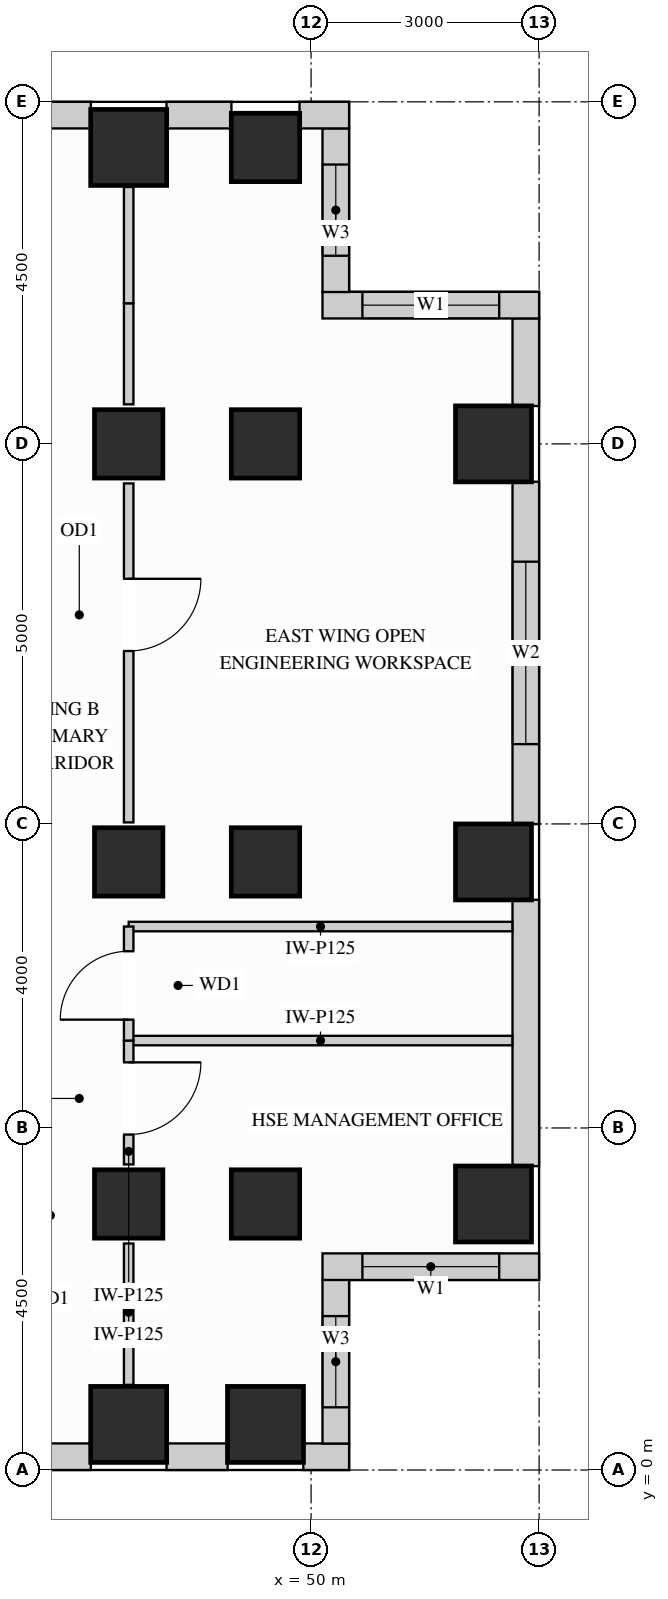
"""IFC4 building model, lengths in metres.
Left out: names, types, materials, properties, quantities, classifications, styles, units other than length and angle.
Written with IfcOpenShell. Run it as: python <this file> out.ifc"""

import sys

from ifc_helpers import new_model, si_unit, direction, frame, frame_2d, origin, origin_2d, place, context, subcontext, project, spatial, rectangle, extrude, source, transform, mapped, element, fill, save


model = new_model("IFC4")
c1 = context("Model", 3, precision=1e-05, world=origin(), true_north=direction((0.0, 1.0)))
c2 = subcontext(c1, "Body", "Model", "MODEL_VIEW")
j1 = project(units=[si_unit("LENGTHUNIT", "METRE"), si_unit("PLANEANGLEUNIT", "RADIAN")], contexts=[c1])
p1 = place(None, origin())
s1 = spatial("IfcSite", under=j1, at=p1, CompositionType="ELEMENT")
p2 = place(p1, origin())
s2 = spatial("IfcBuilding", under=s1, at=p2, CompositionType="ELEMENT")
p3 = place(p2, frame((0.0, 0.0, 157.5)))
s3 = spatial("IfcBuildingStorey", under=s2, at=p3, CompositionType="ELEMENT", Elevation=157.5)
m1 = source(origin(), c2, "Body", "SweptSolid", [
    extrude(rectangle(XDim=0.9, YDim=0.9, at=origin_2d()), origin(), (0.0, 0.0, 1.0), 3.4),
])
for number, where, z_axis, x_axis in (
    (1, (47.6, 13.5, 0.0), (0.0, 0.0, 1.0), (1.0, 0.0, 0.0)),
    (2, (47.6, 3.5, 0.0), (0.0, 0.0, 1.0), (1.0, 0.0, 0.0)),
    (3, (47.6, 8.0, 0.0), (0.0, 0.0, 1.0), (1.0, 0.0, 0.0)),
    (4, (49.4, 13.5, 0.0), (0.0, 0.0, 1.0), (1.0, 0.0, 0.0)),
    (5, (49.4, 17.4, 0.0), (0.0, 0.0, 1.0), (1.0, 0.0, 0.0)),
    (6, (49.4, 3.5, 0.0), (0.0, 0.0, 1.0), (1.0, 0.0, 0.0)),
    (7, (49.4, 8.0, 0.0), (0.0, 0.0, 1.0), (1.0, 0.0, 0.0)),
):
    element("IfcColumn", number, at=place(p3, frame(where, z_axis=z_axis, x_axis=x_axis)), inside=s3, PredefinedType="COLUMN", context=c2, shape_type="MappedRepresentation", body=[
        mapped(m1, transform((0.0, 0.0, 0.0), x_axis=(1.0, 0.0, 0.0), y_axis=(0.0, 1.0, 0.0), z_axis=(0.0, 0.0, 1.0))),
    ])
m2 = source(origin(), c2, "Body", "SweptSolid", [
    extrude(rectangle(XDim=1.0, YDim=1.0, at=origin_2d()), origin(), (0.0, 0.0, 1.0), 3.4),
])
for number, where, z_axis, x_axis in (
    (8, (47.6, 17.4, 0.0), (0.0, 0.0, 1.0), (1.0, 0.0, 0.0)),
    (9, (52.4, 13.5, 0.0), (0.0, 0.0, 1.0), (1.0, 0.0, 0.0)),
    (10, (52.4, 3.5, 0.0), (0.0, 0.0, 1.0), (1.0, 0.0, 0.0)),
    (11, (52.4, 8.0, 0.0), (0.0, 0.0, 1.0), (1.0, 0.0, 0.0)),
    (12, (47.6, 0.6, 0.0), (0.0, 0.0, 1.0), (1.0, 0.0, 0.0)),
    (13, (49.4, 0.6, 0.0), (0.0, 0.0, 1.0), (1.0, 0.0, 0.0)),
):
    element("IfcColumn", number, at=place(p3, frame(where, z_axis=z_axis, x_axis=x_axis)), inside=s3, PredefinedType="COLUMN", context=c2, shape_type="MappedRepresentation", body=[
        mapped(m2, transform((0.0, 0.0, 0.0), x_axis=(1.0, 0.0, 0.0), y_axis=(0.0, 1.0, 0.0), z_axis=(0.0, 0.0, 1.0))),
    ])
p4 = place(p3, frame((40.498, 0.175, 0.0), z_axis=(0.0, 0.0, 1.0), x_axis=(1.0, 0.0, 0.0)))
e14 = element("IfcWall", 14, at=p4, inside=s3, PredefinedType="SOLIDWALL", context=c2, shape_type="SweptSolid", body=[
    extrude(rectangle(XDim=6.604, YDim=0.35, at=frame_2d((3.302, 0.0))), origin(), (0.0, 0.0, 1.0), 2.612),
])
p5 = place(p4, frame((0.737, 0.0, 0.78)))
e15 = element("IfcOpeningElement", 15, at=p5, cuts=e14, PredefinedType="OPENING", context=c2, shape_type="SweptSolid", body=[
    extrude(rectangle(XDim=1.8, YDim=1.652, at=frame_2d((0.9, 0.826))), frame((0.0, 0.185, 0.0), z_axis=(0.0, -1.0, 0.0), x_axis=(1.0, 0.0, 0.0)), (0.0, 0.0, 1.0), 0.37),
])
p6 = place(p4, frame((2.955, 0.0, 0.78)))
e16 = element("IfcOpeningElement", 16, at=p6, cuts=e14, PredefinedType="OPENING", context=c2, shape_type="SweptSolid", body=[
    extrude(rectangle(XDim=1.8, YDim=1.652, at=frame_2d((0.9, 0.826))), frame((0.0, 0.185, 0.0), z_axis=(0.0, -1.0, 0.0), x_axis=(1.0, 0.0, 0.0)), (0.0, 0.0, 1.0), 0.37),
])
m3 = source(origin(), c2, "Body", "SweptSolid", [
    extrude(rectangle(XDim=0.804, YDim=0.35, at=frame_2d((0.402, 0.0))), origin(), (0.0, 0.0, 1.0), 3.385),
])
p7 = place(p3, frame((48.098, 0.175, 0.0), z_axis=(0.0, 0.0, 1.0), x_axis=(1.0, 0.0, 0.0)))
e17 = element("IfcWall", 17, at=p7, inside=s3, PredefinedType="SOLIDWALL", context=c2, shape_type="MappedRepresentation", body=[
    mapped(m3, transform((0.0, 0.0, 0.0), x_axis=(1.0, 0.0, 0.0), y_axis=(0.0, 1.0, 0.0), z_axis=(0.0, 0.0, 1.0))),
])
m4 = source(origin(), c2, "Body", "SweptSolid", [
    extrude(rectangle(XDim=0.602, YDim=0.35, at=frame_2d((0.301, 0.0))), origin(), (0.0, 0.0, 1.0), 3.385),
])
p8 = place(p3, frame((49.898, 0.175, 0.0), z_axis=(0.0, 0.0, 1.0), x_axis=(1.0, 0.0, 0.0)))
e18 = element("IfcWall", 18, at=p8, inside=s3, PredefinedType="SOLIDWALL", context=c2, shape_type="MappedRepresentation", body=[
    mapped(m4, transform((0.0, 0.0, 0.0), x_axis=(1.0, 0.0, 0.0), y_axis=(0.0, 1.0, 0.0), z_axis=(0.0, 0.0, 1.0))),
])
p9 = place(p3, frame((50.325, 0.348, 0.0), z_axis=(0.0, 0.0, 1.0), x_axis=(0.0, 1.0, 0.0)))
e19 = element("IfcWall", 19, at=p9, inside=s3, PredefinedType="SOLIDWALL", context=c2, shape_type="SweptSolid", body=[
    extrude(rectangle(XDim=2.154, YDim=0.35, at=frame_2d((1.077, 0.0))), origin(), (0.0, 0.0, 1.0), 3.385),
])
p10 = place(p9, frame((0.477, 0.0, 0.78)))
e20 = element("IfcOpeningElement", 20, at=p10, cuts=e19, PredefinedType="OPENING", context=c2, shape_type="SweptSolid", body=[
    extrude(rectangle(XDim=1.2, YDim=2.1, at=frame_2d((0.6, 1.05))), frame((0.0, 0.185, 0.0), z_axis=(0.0, -1.0, 0.0), x_axis=(1.0, 0.0, 0.0)), (0.0, 0.0, 1.0), 0.37),
])
p11 = place(p3, frame((50.15, 2.675, 0.0), z_axis=(0.0, 0.0, 1.0), x_axis=(1.0, 0.0, 0.0)))
e21 = element("IfcWall", 21, at=p11, inside=s3, PredefinedType="SOLIDWALL", context=c2, shape_type="SweptSolid", body=[
    extrude(rectangle(XDim=2.85, YDim=0.35, at=frame_2d((1.425, 0.0))), origin(), (0.0, 0.0, 1.0), 3.385),
])
p12 = place(p11, frame((0.525, 0.0, 0.78)))
e22 = element("IfcOpeningElement", 22, at=p12, cuts=e21, PredefinedType="OPENING", context=c2, shape_type="SweptSolid", body=[
    extrude(rectangle(XDim=1.8, YDim=2.1, at=frame_2d((0.9, 1.05))), frame((0.0, 0.185, 0.0), z_axis=(0.0, -1.0, 0.0), x_axis=(1.0, 0.0, 0.0)), (0.0, 0.0, 1.0), 0.37),
])
m5 = source(origin(), c2, "Body", "SweptSolid", [
    extrude(rectangle(XDim=3.504, YDim=0.35, at=frame_2d((1.752, 0.0))), origin(), (0.0, 0.0, 1.0), 2.612),
])
p13 = place(p3, frame((52.825, 3.998, 0.0), z_axis=(0.0, 0.0, 1.0), x_axis=(0.0, 1.0, 0.0)))
e23 = element("IfcWall", 23, at=p13, inside=s3, PredefinedType="SOLIDWALL", context=c2, shape_type="MappedRepresentation", body=[
    mapped(m5, transform((0.0, 0.0, 0.0), x_axis=(1.0, 0.0, 0.0), y_axis=(0.0, 1.0, 0.0), z_axis=(0.0, 0.0, 1.0))),
])
p14 = place(p3, frame((52.825, 8.498, 0.0), z_axis=(0.0, 0.0, 1.0), x_axis=(0.0, 1.0, 0.0)))
e24 = element("IfcWall", 24, at=p14, inside=s3, PredefinedType="SOLIDWALL", context=c2, shape_type="SweptSolid", body=[
    extrude(rectangle(XDim=4.504, YDim=0.35, at=frame_2d((2.252, 0.0))), origin(), (0.0, 0.0, 1.0), 2.612),
])
p15 = place(p14, frame((1.052, 0.0, 0.78)))
e25 = element("IfcOpeningElement", 25, at=p15, cuts=e24, PredefinedType="OPENING", context=c2, shape_type="SweptSolid", body=[
    extrude(rectangle(XDim=2.4, YDim=1.652, at=frame_2d((1.2, 0.826))), frame((0.0, 0.185, 0.0), z_axis=(0.0, -1.0, 0.0), x_axis=(1.0, 0.0, 0.0)), (0.0, 0.0, 1.0), 0.37),
])
m6 = source(origin(), c2, "Body", "SweptSolid", [
    extrude(rectangle(XDim=1.154, YDim=0.35, at=frame_2d((0.577, 0.0))), origin(), (0.0, 0.0, 1.0), 3.385),
])
p16 = place(p3, frame((52.825, 13.998, 0.0), z_axis=(0.0, 0.0, 1.0), x_axis=(0.0, 1.0, 0.0)))
e26 = element("IfcWall", 26, at=p16, inside=s3, PredefinedType="SOLIDWALL", context=c2, shape_type="MappedRepresentation", body=[
    mapped(m6, transform((0.0, 0.0, 0.0), x_axis=(1.0, 0.0, 0.0), y_axis=(0.0, 1.0, 0.0), z_axis=(0.0, 0.0, 1.0))),
])
p17 = place(p3, frame((53.0, 15.325, 0.0), z_axis=(0.0, 0.0, 1.0), x_axis=(-1.0, 0.0, 0.0)))
e27 = element("IfcWall", 27, at=p17, inside=s3, PredefinedType="SOLIDWALL", context=c2, shape_type="SweptSolid", body=[
    extrude(rectangle(XDim=2.85, YDim=0.35, at=frame_2d((1.425, 0.0))), origin(), (0.0, 0.0, 1.0), 3.385),
])
p18 = place(p17, frame((0.525, 0.0, 0.78)))
e28 = element("IfcOpeningElement", 28, at=p18, cuts=e27, PredefinedType="OPENING", context=c2, shape_type="SweptSolid", body=[
    extrude(rectangle(XDim=1.8, YDim=2.1, at=frame_2d((0.9, 1.05))), frame((0.0, 0.185, 0.0), z_axis=(0.0, -1.0, 0.0), x_axis=(1.0, 0.0, 0.0)), (0.0, 0.0, 1.0), 0.37),
])
p19 = place(p3, frame((50.325, 15.498, 0.0), z_axis=(0.0, 0.0, 1.0), x_axis=(0.0, 1.0, 0.0)))
e29 = element("IfcWall", 29, at=p19, inside=s3, PredefinedType="SOLIDWALL", context=c2, shape_type="SweptSolid", body=[
    extrude(rectangle(XDim=2.154, YDim=0.35, at=frame_2d((1.077, 0.0))), origin(), (0.0, 0.0, 1.0), 3.385),
])
p20 = place(p19, frame((0.477, 0.0, 0.78)))
e30 = element("IfcOpeningElement", 30, at=p20, cuts=e29, PredefinedType="OPENING", context=c2, shape_type="SweptSolid", body=[
    extrude(rectangle(XDim=1.2, YDim=2.1, at=frame_2d((0.6, 1.05))), frame((0.0, 0.185, 0.0), z_axis=(0.0, -1.0, 0.0), x_axis=(1.0, 0.0, 0.0)), (0.0, 0.0, 1.0), 0.37),
])
m7 = source(origin(), c2, "Body", "SweptSolid", [
    extrude(rectangle(XDim=0.652, YDim=0.35, at=frame_2d((0.326, 0.0))), origin(), (0.0, 0.0, 1.0), 3.385),
])
p21 = place(p3, frame((50.5, 17.825, 0.0), z_axis=(0.0, 0.0, 1.0), x_axis=(-1.0, 0.0, 0.0)))
e31 = element("IfcWall", 31, at=p21, inside=s3, PredefinedType="SOLIDWALL", context=c2, shape_type="MappedRepresentation", body=[
    mapped(m7, transform((0.0, 0.0, 0.0), x_axis=(1.0, 0.0, 0.0), y_axis=(0.0, 1.0, 0.0), z_axis=(0.0, 0.0, 1.0))),
])
m8 = source(origin(), c2, "Body", "SweptSolid", [
    extrude(rectangle(XDim=0.854, YDim=0.35, at=frame_2d((0.427, 0.0))), origin(), (0.0, 0.0, 1.0), 3.385),
])
p22 = place(p3, frame((48.952, 17.825, 0.0), z_axis=(0.0, 0.0, 1.0), x_axis=(-1.0, 0.0, 0.0)))
e32 = element("IfcWall", 32, at=p22, inside=s3, PredefinedType="SOLIDWALL", context=c2, shape_type="MappedRepresentation", body=[
    mapped(m8, transform((0.0, 0.0, 0.0), x_axis=(1.0, 0.0, 0.0), y_axis=(0.0, 1.0, 0.0), z_axis=(0.0, 0.0, 1.0))),
])
p23 = place(p3, frame((47.102, 17.825, 0.0), z_axis=(0.0, 0.0, 1.0), x_axis=(-1.0, 0.0, 0.0)))
e33 = element("IfcWall", 33, at=p23, inside=s3, PredefinedType="SOLIDWALL", context=c2, shape_type="SweptSolid", body=[
    extrude(rectangle(XDim=6.604, YDim=0.35, at=frame_2d((3.302, 0.0))), origin(), (0.0, 0.0, 1.0), 2.612),
])
p24 = place(p23, frame((1.849, 0.0, 0.78)))
e34 = element("IfcOpeningElement", 34, at=p24, cuts=e33, PredefinedType="OPENING", context=c2, shape_type="SweptSolid", body=[
    extrude(rectangle(XDim=1.8, YDim=1.652, at=frame_2d((0.9, 0.826))), frame((0.0, 0.185, 0.0), z_axis=(0.0, -1.0, 0.0), x_axis=(1.0, 0.0, 0.0)), (0.0, 0.0, 1.0), 0.37),
])
p25 = place(p23, frame((4.067, 0.0, 0.78)))
e35 = element("IfcOpeningElement", 35, at=p25, cuts=e33, PredefinedType="OPENING", context=c2, shape_type="SweptSolid", body=[
    extrude(rectangle(XDim=1.8, YDim=1.652, at=frame_2d((0.9, 0.826))), frame((0.0, 0.185, 0.0), z_axis=(0.0, -1.0, 0.0), x_axis=(1.0, 0.0, 0.0)), (0.0, 0.0, 1.0), 0.37),
])
m9 = source(origin(), c2, "Body", "SweptSolid", [
    extrude(rectangle(XDim=5.048, YDim=0.125, at=frame_2d((2.524, 0.0))), origin(), (0.0, 0.0, 1.0), 3.385),
])
for number, where, z_axis, x_axis in (
    (36, (47.6, 5.65, 0.0), (0.0, 0.0, 1.0), (1.0, 0.0, 0.0)),
    (37, (47.6, 7.15, 0.0), (0.0, 0.0, 1.0), (1.0, 0.0, 0.0)),
):
    element("IfcWall", number, at=place(p3, frame(where, z_axis=z_axis, x_axis=x_axis)), inside=s3, PredefinedType="PARTITIONING", context=c2, shape_type="MappedRepresentation", body=[
        mapped(m9, transform((0.0, 0.0, 0.0), x_axis=(1.0, 0.0, 0.0), y_axis=(0.0, 1.0, 0.0), z_axis=(0.0, 0.0, 1.0))),
    ])
p26 = place(p3, frame((47.6, 4.02, 0.0), z_axis=(0.0, 0.0, 1.0), x_axis=(0.0, 1.0, 0.0)))
e38 = element("IfcWall", 38, at=p26, inside=s3, PredefinedType="PARTITIONING", context=c2, shape_type="SweptSolid", body=[
    extrude(rectangle(XDim=1.63, YDim=0.125, at=frame_2d((0.815, 0.0))), origin(), (0.0, 0.0, 1.0), 2.773),
])
p27 = place(p26, frame((0.393, 0.0, 0.0)))
e39 = element("IfcOpeningElement", 39, at=p27, cuts=e38, PredefinedType="OPENING", context=c2, shape_type="SweptSolid", body=[
    extrude(rectangle(XDim=0.95, YDim=2.15, at=frame_2d((0.475, 1.075))), frame((0.0, 0.073, 0.0), z_axis=(0.0, -1.0, 0.0), x_axis=(1.0, 0.0, 0.0)), (0.0, 0.0, 1.0), 0.145),
])
m10 = source(origin(), c2, "Body", "SweptSolid", [
    extrude(rectangle(XDim=1.86, YDim=0.125, at=frame_2d((0.93, 0.0))), origin(), (0.0, 0.0, 1.0), 2.773),
])
p28 = place(p3, frame((47.6, 1.12, 0.0), z_axis=(0.0, 0.0, 1.0), x_axis=(0.0, 1.0, 0.0)))
e40 = element("IfcWall", 40, at=p28, inside=s3, PredefinedType="PARTITIONING", context=c2, shape_type="MappedRepresentation", body=[
    mapped(m10, transform((0.0, 0.0, 0.0), x_axis=(1.0, 0.0, 0.0), y_axis=(0.0, 1.0, 0.0), z_axis=(0.0, 0.0, 1.0))),
])
p29 = place(p3, frame((47.6, 8.52, 0.0), z_axis=(0.0, 0.0, 1.0), x_axis=(0.0, 1.0, 0.0)))
e41 = element("IfcWall", 41, at=p29, inside=s3, PredefinedType="PARTITIONING", context=c2, shape_type="SweptSolid", body=[
    extrude(rectangle(XDim=4.46, YDim=0.125, at=frame_2d((2.23, 0.0))), origin(), (0.0, 0.0, 1.0), 2.773),
])
p30 = place(p29, frame((2.255, 0.0, 0.0)))
e42 = element("IfcOpeningElement", 42, at=p30, cuts=e41, PredefinedType="OPENING", context=c2, shape_type="SweptSolid", body=[
    extrude(rectangle(XDim=0.95, YDim=2.15, at=frame_2d((0.475, 1.075))), frame((0.0, 0.073, 0.0), z_axis=(0.0, -1.0, 0.0), x_axis=(1.0, 0.0, 0.0)), (0.0, 0.0, 1.0), 0.145),
])
m11 = source(origin(), c2, "Body", "SweptSolid", [
    extrude(rectangle(XDim=1.33, YDim=0.125, at=frame_2d((0.665, 0.0))), origin(), (0.0, 0.0, 1.0), 2.773),
])
p31 = place(p3, frame((47.6, 14.02, 0.0), z_axis=(0.0, 0.0, 1.0), x_axis=(0.0, 1.0, 0.0)))
e43 = element("IfcWall", 43, at=p31, inside=s3, PredefinedType="PARTITIONING", context=c2, shape_type="MappedRepresentation", body=[
    mapped(m11, transform((0.0, 0.0, 0.0), x_axis=(1.0, 0.0, 0.0), y_axis=(0.0, 1.0, 0.0), z_axis=(0.0, 0.0, 1.0))),
])
m12 = source(origin(), c2, "Body", "SweptSolid", [
    extrude(rectangle(XDim=1.53, YDim=0.125, at=frame_2d((0.765, 0.0))), origin(), (0.0, 0.0, 1.0), 2.773),
])
p32 = place(p3, frame((47.6, 15.35, 0.0), z_axis=(0.0, 0.0, 1.0), x_axis=(0.0, 1.0, 0.0)))
e44 = element("IfcWall", 44, at=p32, inside=s3, PredefinedType="PARTITIONING", context=c2, shape_type="MappedRepresentation", body=[
    mapped(m12, transform((0.0, 0.0, 0.0), x_axis=(1.0, 0.0, 0.0), y_axis=(0.0, 1.0, 0.0), z_axis=(0.0, 0.0, 1.0))),
])
p33 = place(p3, frame((47.6, 5.65, 0.0), z_axis=(0.0, 0.0, 1.0), x_axis=(0.0, 1.0, 0.0)))
e45 = element("IfcWall", 45, at=p33, inside=s3, PredefinedType="PARTITIONING", context=c2, shape_type="SweptSolid", body=[
    extrude(rectangle(XDim=1.5, YDim=0.125, at=frame_2d((0.75, 0.0))), origin(), (0.0, 0.0, 1.0), 2.773),
])
p34 = place(p33, frame((0.275, 0.0, 0.0)))
e46 = element("IfcOpeningElement", 46, at=p34, cuts=e45, PredefinedType="OPENING", context=c2, shape_type="SweptSolid", body=[
    extrude(rectangle(XDim=0.9, YDim=2.15, at=frame_2d((0.45, 1.075))), frame((0.0, 0.073, 0.0), z_axis=(0.0, -1.0, 0.0), x_axis=(1.0, 0.0, 0.0)), (0.0, 0.0, 1.0), 0.145),
])
m13 = source(origin(), c2, "Body", "SweptSolid", [
    extrude(rectangle(XDim=0.95, YDim=2.15, at=frame_2d((0.475, 1.075))), frame((0.0, 0.025, 0.0), z_axis=(0.0, -1.0, 0.0), x_axis=(1.0, 0.0, 0.0)), (0.0, 0.0, 1.0), 0.05),
])
p35 = place(p27, origin())
e47 = element("IfcDoor", 47, at=p35, inside=s3, OperationType="SINGLE_SWING_RIGHT", PredefinedType="DOOR", context=c2, shape_type="MappedRepresentation", body=[
    mapped(m13, transform((0.0, 0.0, 0.0), x_axis=(1.0, 0.0, 0.0), y_axis=(0.0, 1.0, 0.0), z_axis=(0.0, 0.0, 1.0))),
])
fill(e39, e47)
p36 = place(p30, origin())
e48 = element("IfcDoor", 48, at=p36, inside=s3, OperationType="SINGLE_SWING_RIGHT", PredefinedType="DOOR", context=c2, shape_type="MappedRepresentation", body=[
    mapped(m13, transform((0.0, 0.0, 0.0), x_axis=(1.0, 0.0, 0.0), y_axis=(0.0, 1.0, 0.0), z_axis=(0.0, 0.0, 1.0))),
])
fill(e42, e48)
m14 = source(origin(), c2, "Body", "SweptSolid", [
    extrude(rectangle(XDim=0.9, YDim=2.15, at=frame_2d((0.45, 1.075))), frame((0.0, 0.025, 0.0), z_axis=(0.0, -1.0, 0.0), x_axis=(1.0, 0.0, 0.0)), (0.0, 0.0, 1.0), 0.05),
])
p37 = place(p34, origin())
e49 = element("IfcDoor", 49, at=p37, inside=s3, OperationType="SINGLE_SWING_LEFT", PredefinedType="DOOR", context=c2, shape_type="MappedRepresentation", body=[
    mapped(m14, transform((0.0, 0.0, 0.0), x_axis=(1.0, 0.0, 0.0), y_axis=(0.0, 1.0, 0.0), z_axis=(0.0, 0.0, 1.0))),
])
fill(e46, e49)
m15 = source(origin(), c2, "Body", "SweptSolid", [
    extrude(rectangle(XDim=1.8, YDim=2.1, at=frame_2d((0.9, 1.05))), frame((0.0, 0.03, 0.0), z_axis=(0.0, -1.0, 0.0), x_axis=(1.0, 0.0, 0.0)), (0.0, 0.0, 1.0), 0.06),
])
p38 = place(p12, origin())
e50 = element("IfcWindow", 50, at=p38, inside=s3, PartitioningType="SINGLE_PANEL", PredefinedType="WINDOW", context=c2, shape_type="MappedRepresentation", body=[
    mapped(m15, transform((0.0, 0.0, 0.0), x_axis=(1.0, 0.0, 0.0), y_axis=(0.0, 1.0, 0.0), z_axis=(0.0, 0.0, 1.0))),
])
fill(e22, e50)
p39 = place(p18, origin())
e51 = element("IfcWindow", 51, at=p39, inside=s3, PartitioningType="SINGLE_PANEL", PredefinedType="WINDOW", context=c2, shape_type="MappedRepresentation", body=[
    mapped(m15, transform((0.0, 0.0, 0.0), x_axis=(1.0, 0.0, 0.0), y_axis=(0.0, 1.0, 0.0), z_axis=(0.0, 0.0, 1.0))),
])
fill(e28, e51)
m16 = source(origin(), c2, "Body", "SweptSolid", [
    extrude(rectangle(XDim=2.4, YDim=1.652, at=frame_2d((1.2, 0.826))), frame((0.0, 0.03, 0.0), z_axis=(0.0, -1.0, 0.0), x_axis=(1.0, 0.0, 0.0)), (0.0, 0.0, 1.0), 0.06),
])
p40 = place(p15, origin())
e52 = element("IfcWindow", 52, at=p40, inside=s3, PartitioningType="SINGLE_PANEL", PredefinedType="WINDOW", context=c2, shape_type="MappedRepresentation", body=[
    mapped(m16, transform((0.0, 0.0, 0.0), x_axis=(1.0, 0.0, 0.0), y_axis=(0.0, 1.0, 0.0), z_axis=(0.0, 0.0, 1.0))),
])
fill(e25, e52)
m17 = source(origin(), c2, "Body", "SweptSolid", [
    extrude(rectangle(XDim=1.2, YDim=2.1, at=frame_2d((0.6, 1.05))), frame((0.0, 0.03, 0.0), z_axis=(0.0, -1.0, 0.0), x_axis=(1.0, 0.0, 0.0)), (0.0, 0.0, 1.0), 0.06),
])
p41 = place(p10, origin())
e53 = element("IfcWindow", 53, at=p41, inside=s3, PartitioningType="SINGLE_PANEL", PredefinedType="WINDOW", context=c2, shape_type="MappedRepresentation", body=[
    mapped(m17, transform((0.0, 0.0, 0.0), x_axis=(1.0, 0.0, 0.0), y_axis=(0.0, 1.0, 0.0), z_axis=(0.0, 0.0, 1.0))),
])
fill(e20, e53)
p42 = place(p20, origin())
e54 = element("IfcWindow", 54, at=p42, inside=s3, PartitioningType="SINGLE_PANEL", PredefinedType="WINDOW", context=c2, shape_type="MappedRepresentation", body=[
    mapped(m17, transform((0.0, 0.0, 0.0), x_axis=(1.0, 0.0, 0.0), y_axis=(0.0, 1.0, 0.0), z_axis=(0.0, 0.0, 1.0))),
])
fill(e30, e54)
save(model, sys.argv[1])
